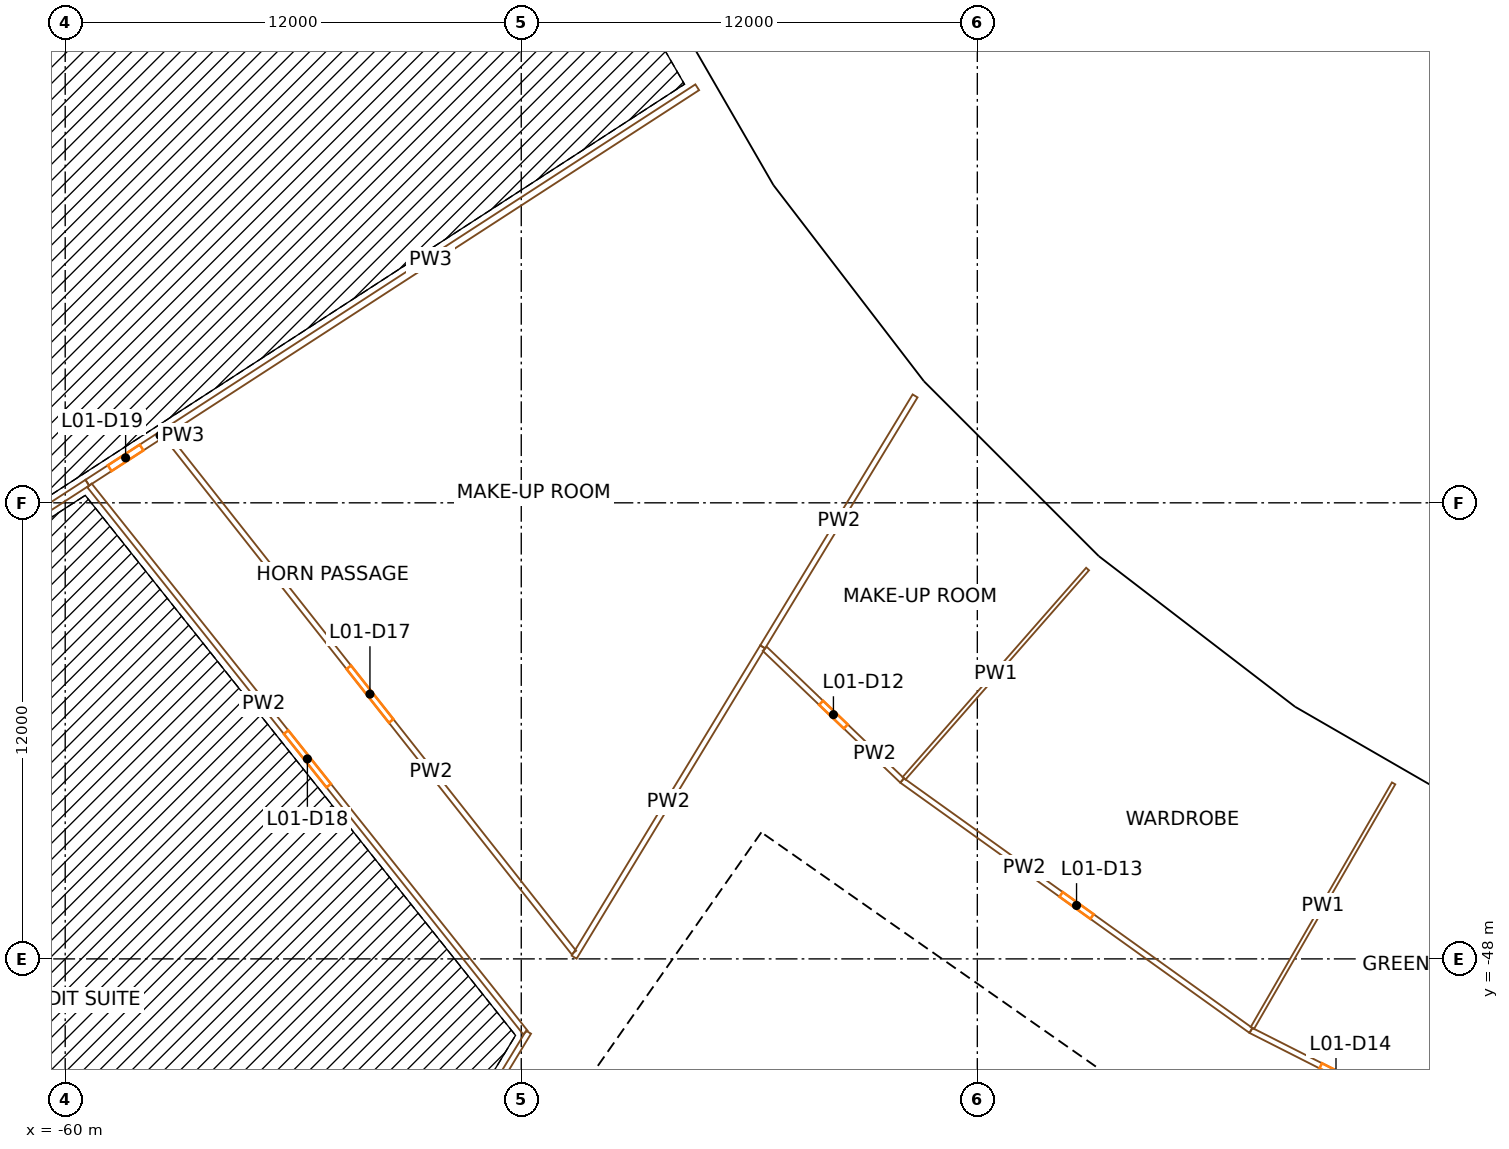
"""IFC4 building model, lengths in metres.
Left out: names, types, materials, properties, quantities, classifications, styles, units other than length and angle.
Written with IfcOpenShell. Run it as: python <this file> out.ifc"""

import sys

from ifc_helpers import new_model, si_unit, direction, frame, frame_2d, origin, origin_2d, place, context, subcontext, project, spatial, rectangle, extrude, element, fill, save


model = new_model("IFC4")
c1 = context("Model", 3, precision=1e-05, world=origin(), true_north=direction((0.0, 1.0)))
c2 = subcontext(c1, "Body", "Model", "MODEL_VIEW")
j1 = project(units=[si_unit("LENGTHUNIT", "METRE"), si_unit("PLANEANGLEUNIT", "RADIAN")], contexts=[c1])
p1 = place(None, origin())
s1 = spatial("IfcSite", under=j1, at=p1, CompositionType="ELEMENT")
p2 = place(p1, origin())
s2 = spatial("IfcBuilding", under=s1, at=p2, CompositionType="ELEMENT")
p3 = place(p2, frame((0.0, 0.0, 9.0)))
s3 = spatial("IfcBuildingStorey", under=s2, at=p3, CompositionType="ELEMENT", Elevation=9.0)
p4 = place(p3, frame((-52.243, -25.763, 0.0), z_axis=(0.0, 0.0, 1.0), x_axis=(0.442288690219, -0.896872741533, 0.0)))
e1 = element("IfcColumn", 1, at=p4, inside=s3, PredefinedType="COLUMN", context=c2, shape_type="SweptSolid", body=[
    extrude(rectangle(XDim=1.4, YDim=1.8, at=origin_2d()), origin(), (0.0, 0.0, 1.0), 9.0),
])
p5 = place(p3, frame((-42.197, -28.195, 0.0), z_axis=(0.0, 0.0, 1.0), x_axis=(0.55557023302, -0.831469612303, 0.0)))
e2 = element("IfcColumn", 2, at=p5, inside=s3, PredefinedType="COLUMN", context=c2, shape_type="SweptSolid", body=[
    extrude(rectangle(XDim=1.1, YDim=1.3, at=origin_2d()), origin(), (0.0, 0.0, 1.0), 9.0),
])
p6 = place(p3, frame((-48.433, -32.362, 0.0), z_axis=(0.0, 0.0, 1.0), x_axis=(0.55557023302, -0.831469612303, 0.0)))
e3 = element("IfcColumn", 3, at=p6, inside=s3, PredefinedType="COLUMN", context=c2, shape_type="SweptSolid", body=[
    extrude(rectangle(XDim=1.4, YDim=1.8, at=origin_2d()), origin(), (0.0, 0.0, 1.0), 9.0),
])
p7 = place(p3, frame((-38.156, -33.462, 0.0), z_axis=(0.0, 0.0, 1.0), x_axis=(0.6593458151, -0.751839807479, 0.0)))
e4 = element("IfcColumn", 4, at=p7, inside=s3, PredefinedType="COLUMN", context=c2, shape_type="SweptSolid", body=[
    extrude(rectangle(XDim=1.1, YDim=1.3, at=origin_2d()), origin(), (0.0, 0.0, 1.0), 9.0),
])
for number, where, z_axis, x_axis in (
    (5, (-43.795, -38.407, 0.0), (0.0, 0.0, 1.0), (0.659, -0.752, 0.0)),
    (6, (-58.456, -51.264, 0.0), (0.0, 0.0, 1.0), (0.659, -0.752, 0.0)),
):
    element("IfcColumn", number, at=place(p3, frame(where, z_axis=z_axis, x_axis=x_axis)), inside=s3, PredefinedType="COLUMN", context=c2, shape_type="SweptSolid", body=[
        extrude(rectangle(XDim=1.4, YDim=1.8, at=origin_2d()), origin(), (0.0, 0.0, 1.0), 9.0),
    ])
p8 = place(p3, frame((-33.462, -38.156, 0.0), z_axis=(0.0, 0.0, 1.0), x_axis=(0.751839807479, -0.6593458151, 0.0)))
e7 = element("IfcColumn", 7, at=p8, inside=s3, PredefinedType="COLUMN", context=c2, shape_type="SweptSolid", body=[
    extrude(rectangle(XDim=1.1, YDim=1.3, at=origin_2d()), origin(), (0.0, 0.0, 1.0), 9.0),
])
p9 = place(p3, frame((-38.407, -43.795, 0.0), z_axis=(0.0, 0.0, 1.0), x_axis=(0.751839807479, -0.6593458151, 0.0)))
e8 = element("IfcColumn", 8, at=p9, inside=s3, PredefinedType="COLUMN", context=c2, shape_type="SweptSolid", body=[
    extrude(rectangle(XDim=1.4, YDim=1.8, at=origin_2d()), origin(), (0.0, 0.0, 1.0), 9.0),
])
p10 = place(p3, frame((-28.195, -42.197, 0.0), z_axis=(0.0, 0.0, 1.0), x_axis=(0.831469612303, -0.55557023302, 0.0)))
e9 = element("IfcColumn", 9, at=p10, inside=s3, PredefinedType="COLUMN", context=c2, shape_type="SweptSolid", body=[
    extrude(rectangle(XDim=1.1, YDim=1.3, at=origin_2d()), origin(), (0.0, 0.0, 1.0), 9.0),
])
p11 = place(p3, frame((-32.362, -48.433, 0.0), z_axis=(0.0, 0.0, 1.0), x_axis=(0.831469612303, -0.55557023302, 0.0)))
e10 = element("IfcColumn", 10, at=p11, inside=s3, PredefinedType="COLUMN", context=c2, shape_type="SweptSolid", body=[
    extrude(rectangle(XDim=1.4, YDim=1.8, at=origin_2d()), origin(), (0.0, 0.0, 1.0), 9.0),
])
p12 = place(p3, frame((-49.779, -57.191, 0.0), z_axis=(0.0, 0.0, 1.0), x_axis=(0.573577477574, 0.819151315216, 0.0)))
e11 = element("IfcWall", 11, at=p12, inside=s3, PredefinedType="SHEAR", context=c2, shape_type="SweptSolid", body=[
    extrude(rectangle(XDim=14.8, YDim=0.9, at=frame_2d((7.4, 0.0))), origin(), (0.0, 0.0, 1.0), 8.6),
])
p13 = place(p12, frame((6.7, 0.0, 0.0)))
e12 = element("IfcOpeningElement", 12, at=p13, cuts=e11, PredefinedType="OPENING", context=c2, shape_type="SweptSolid", body=[
    extrude(rectangle(XDim=1.4, YDim=2.1, at=frame_2d((0.7, 1.05))), frame((0.0, 0.46, 0.0), z_axis=(0.0, -1.0, 0.0), x_axis=(1.0, 0.0, 0.0)), (0.0, 0.0, 1.0), 0.92),
])
p14 = place(p3, frame((-28.854, -54.324, 0.0), z_axis=(0.0, 0.0, 1.0), x_axis=(-0.819145767589, 0.573585400304, 0.0)))
e13 = element("IfcWall", 13, at=p14, inside=s3, PredefinedType="SHEAR", context=c2, shape_type="SweptSolid", body=[
    extrude(rectangle(XDim=15.045, YDim=0.9, at=frame_2d((7.523, 0.0))), origin(), (0.0, 0.0, 1.0), 8.6),
])
p15 = place(p14, frame((0.85, 0.0, 0.0)))
e14 = element("IfcOpeningElement", 14, at=p15, cuts=e13, PredefinedType="OPENING", context=c2, shape_type="SweptSolid", body=[
    extrude(rectangle(XDim=1.0, YDim=2.1, at=frame_2d((0.5, 1.05))), frame((0.0, 0.46, 0.0), z_axis=(0.0, -1.0, 0.0), x_axis=(1.0, 0.0, 0.0)), (0.0, 0.0, 1.0), 0.92),
])
p16 = place(p14, frame((3.575, 0.0, 0.0)))
e15 = element("IfcOpeningElement", 15, at=p16, cuts=e13, PredefinedType="OPENING", context=c2, shape_type="SweptSolid", body=[
    extrude(rectangle(XDim=1.0, YDim=2.1, at=frame_2d((0.5, 1.05))), frame((0.0, 0.46, 0.0), z_axis=(0.0, -1.0, 0.0), x_axis=(1.0, 0.0, 0.0)), (0.0, 0.0, 1.0), 0.92),
])
p17 = place(p14, frame((6.275, 0.0, 0.0)))
e16 = element("IfcOpeningElement", 16, at=p17, cuts=e13, PredefinedType="OPENING", context=c2, shape_type="SweptSolid", body=[
    extrude(rectangle(XDim=0.9, YDim=2.1, at=frame_2d((0.45, 1.05))), frame((0.0, 0.46, 0.0), z_axis=(0.0, -1.0, 0.0), x_axis=(1.0, 0.0, 0.0)), (0.0, 0.0, 1.0), 0.92),
])
p18 = place(p14, frame((13.495, 0.0, 0.0)))
e17 = element("IfcOpeningElement", 17, at=p18, cuts=e13, PredefinedType="OPENING", context=c2, shape_type="SweptSolid", body=[
    extrude(rectangle(XDim=1.1, YDim=2.1, at=frame_2d((0.55, 1.05))), frame((0.0, 0.46, 0.0), z_axis=(0.0, -1.0, 0.0), x_axis=(1.0, 0.0, 0.0)), (0.0, 0.0, 1.0), 0.92),
])
p19 = place(p3, frame((-43.204, -60.696, 0.0), z_axis=(0.0, 0.0, 1.0), x_axis=(0.573571992966, 0.819155155563, 0.0)))
e18 = element("IfcWall", 18, at=p19, inside=s3, PredefinedType="SOLIDWALL", context=c2, shape_type="SweptSolid", body=[
    extrude(rectangle(XDim=13.0, YDim=0.3, at=frame_2d((6.5, 0.0))), origin(), (0.0, 0.0, 1.0), 8.6),
])
p20 = place(p3, frame((-37.936, -52.91, 0.0), z_axis=(0.0, 0.0, 1.0), x_axis=(-0.819147518138, 0.57358290031, 0.0)))
e19 = element("IfcWall", 19, at=p20, inside=s3, PredefinedType="SOLIDWALL", context=c2, shape_type="SweptSolid", body=[
    extrude(rectangle(XDim=6.795, YDim=0.3, at=frame_2d((3.398, 0.0))), origin(), (0.0, 0.0, 1.0), 8.6),
])
p21 = place(p20, frame((5.32, 0.0, 0.0)))
e20 = element("IfcOpeningElement", 20, at=p21, cuts=e19, PredefinedType="OPENING", context=c2, shape_type="SweptSolid", body=[
    extrude(rectangle(XDim=1.1, YDim=2.1, at=frame_2d((0.55, 1.05))), frame((0.0, 0.16, 0.0), z_axis=(0.0, -1.0, 0.0), x_axis=(1.0, 0.0, 0.0)), (0.0, 0.0, 1.0), 0.32),
])
p22 = place(p3, frame((-41.587, -48.369, 0.0), z_axis=(0.0, 0.0, 1.0), x_axis=(0.573495128918, 0.819208970354, 0.0)))
e21 = element("IfcWall", 21, at=p22, inside=s3, PredefinedType="SOLIDWALL", context=c2, shape_type="SweptSolid", body=[
    extrude(rectangle(XDim=0.5, YDim=0.3, at=frame_2d((0.25, 0.0))), origin(), (0.0, 0.0, 1.0), 4.3),
])
p23 = place(p3, frame((-41.583, -27.714, 0.0), z_axis=(0.0, 0.0, 1.0), x_axis=(-0.50000447882, 0.866022817921, 0.0)))
e22 = element("IfcWall", 22, at=p23, inside=s3, PredefinedType="SOLIDWALL", context=c2, shape_type="SweptSolid", body=[
    extrude(rectangle(XDim=6.419, YDim=0.45, at=frame_2d((3.21, 0.0))), origin(), (0.0, 0.0, 1.0), 7.7),
])
p24 = place(p3, frame((-37.555, -32.975, 0.0), z_axis=(0.0, 0.0, 1.0), x_axis=(-0.608780327927, 0.793338838284, 0.0)))
e23 = element("IfcWall", 23, at=p24, inside=s3, PredefinedType="SOLIDWALL", context=c2, shape_type="SweptSolid", body=[
    extrude(rectangle(XDim=6.597, YDim=0.45, at=frame_2d((3.298, 0.0))), origin(), (0.0, 0.0, 1.0), 7.7),
])
p25 = place(p3, frame((-32.993, -37.532, 0.0), z_axis=(0.0, 0.0, 1.0), x_axis=(-0.707106781187, 0.707106781187, 0.0)))
e24 = element("IfcWall", 24, at=p25, inside=s3, PredefinedType="SOLIDWALL", context=c2, shape_type="SweptSolid", body=[
    extrude(rectangle(XDim=6.419, YDim=0.45, at=frame_2d((3.209, 0.0))), origin(), (0.0, 0.0, 1.0), 7.7),
])
p26 = place(p3, frame((-27.741, -41.571, 0.0), z_axis=(0.0, 0.0, 1.0), x_axis=(-0.793338838284, 0.608780327927, 0.0)))
e25 = element("IfcWall", 25, at=p26, inside=s3, PredefinedType="SOLIDWALL", context=c2, shape_type="SweptSolid", body=[
    extrude(rectangle(XDim=6.597, YDim=0.45, at=frame_2d((3.298, 0.0))), origin(), (0.0, 0.0, 1.0), 7.7),
])
p27 = place(p3, frame((-22.155, -44.792, 0.0), z_axis=(0.0, 0.0, 1.0), x_axis=(-0.866022817921, 0.50000447882, 0.0)))
e26 = element("IfcWall", 26, at=p27, inside=s3, PredefinedType="SOLIDWALL", context=c2, shape_type="SweptSolid", body=[
    extrude(rectangle(XDim=6.419, YDim=0.45, at=frame_2d((3.21, 0.0))), origin(), (0.0, 0.0, 1.0), 7.7),
])
p28 = place(p3, frame((-73.217, -44.416, 0.0), z_axis=(0.0, 0.0, 1.0), x_axis=(0.839098650594, 0.543979277703, 0.0)))
e27 = element("IfcWall", 27, at=p28, inside=s3, PredefinedType="PARTITIONING", context=c2, shape_type="SweptSolid", body=[
    extrude(rectangle(XDim=16.445, YDim=0.18, at=frame_2d((8.223, 0.0))), origin(), (0.0, 0.0, 1.0), 7.6),
])
p29 = place(p3, frame((-59.418, -35.47, 0.0), z_axis=(0.0, 0.0, 1.0), x_axis=(0.839081673018, 0.544005465051, 0.0)))
e28 = element("IfcWall", 28, at=p29, inside=s3, PredefinedType="PARTITIONING", context=c2, shape_type="SweptSolid", body=[
    extrude(rectangle(XDim=2.402, YDim=0.18, at=frame_2d((1.201, 0.0))), origin(), (0.0, 0.0, 1.0), 7.6),
])
p30 = place(p29, frame((0.701, 0.0, 0.0)))
e29 = element("IfcOpeningElement", 29, at=p30, cuts=e28, PredefinedType="OPENING", context=c2, shape_type="SweptSolid", body=[
    extrude(rectangle(XDim=1.0, YDim=2.1, at=frame_2d((0.5, 1.05))), frame((0.0, 0.1, 0.0), z_axis=(0.0, -1.0, 0.0), x_axis=(1.0, 0.0, 0.0)), (0.0, 0.0, 1.0), 0.2),
])
p31 = place(p3, frame((-57.403, -34.164, 0.0), z_axis=(0.0, 0.0, 1.0), x_axis=(0.83909708633, 0.543981690604, 0.0)))
e30 = element("IfcWall", 30, at=p31, inside=s3, PredefinedType="PARTITIONING", context=c2, shape_type="SweptSolid", body=[
    extrude(rectangle(XDim=16.723, YDim=0.18, at=frame_2d((8.362, 0.0))), origin(), (0.0, 0.0, 1.0), 7.6),
])
p32 = place(p3, frame((-47.893, -49.935, 0.0), z_axis=(0.0, 0.0, 1.0), x_axis=(-0.623145641882, 0.782105817011, 0.0)))
e31 = element("IfcWall", 31, at=p32, inside=s3, PredefinedType="PARTITIONING", context=c2, shape_type="SweptSolid", body=[
    extrude(rectangle(XDim=18.404, YDim=0.15, at=frame_2d((9.202, 0.0))), origin(), (0.0, 0.0, 1.0), 7.6),
])
p33 = place(p32, frame((8.302, 0.0, 0.0)))
e32 = element("IfcOpeningElement", 32, at=p33, cuts=e31, PredefinedType="OPENING", context=c2, shape_type="SweptSolid", body=[
    extrude(rectangle(XDim=1.8, YDim=2.1, at=frame_2d((0.9, 1.05))), frame((0.0, 0.085, 0.0), z_axis=(0.0, -1.0, 0.0), x_axis=(1.0, 0.0, 0.0)), (0.0, 0.0, 1.0), 0.17),
])
p34 = place(p3, frame((-47.808, -49.929, 0.0), z_axis=(0.0, 0.0, 1.0), x_axis=(-0.519169679695, -0.854671190392, 0.0)))
e33 = element("IfcWall", 33, at=p34, inside=s3, PredefinedType="PARTITIONING", context=c2, shape_type="SweptSolid", body=[
    extrude(rectangle(XDim=9.878, YDim=0.15, at=frame_2d((4.939, 0.0))), origin(), (0.0, 0.0, 1.0), 7.6),
])
p35 = place(p3, frame((-57.347, -34.235, 0.0), z_axis=(0.0, 0.0, 1.0), x_axis=(0.619516324984, -0.784983772494, 0.0)))
e34 = element("IfcWall", 34, at=p35, inside=s3, PredefinedType="PARTITIONING", context=c2, shape_type="SweptSolid", body=[
    extrude(rectangle(XDim=17.322, YDim=0.15, at=frame_2d((8.661, 0.0))), origin(), (0.0, 0.0, 1.0), 7.6),
])
p36 = place(p35, frame((7.761, 0.0, 0.0)))
e35 = element("IfcOpeningElement", 35, at=p36, cuts=e34, PredefinedType="OPENING", context=c2, shape_type="SweptSolid", body=[
    extrude(rectangle(XDim=1.8, YDim=2.1, at=frame_2d((0.9, 1.05))), frame((0.0, 0.085, 0.0), z_axis=(0.0, -1.0, 0.0), x_axis=(1.0, 0.0, 0.0)), (0.0, 0.0, 1.0), 0.17),
])
p37 = place(p3, frame((-41.648, -39.789, 0.0), z_axis=(0.0, 0.0, 1.0), x_axis=(-0.519144162426, -0.854686690325, 0.0)))
e36 = element("IfcWall", 36, at=p37, inside=s3, PredefinedType="PARTITIONING", context=c2, shape_type="SweptSolid", body=[
    extrude(rectangle(XDim=9.554, YDim=0.15, at=frame_2d((4.777, 0.0))), origin(), (0.0, 0.0, 1.0), 7.6),
])
p38 = place(p3, frame((-41.594, -39.841, 0.0), z_axis=(0.0, 0.0, 1.0), x_axis=(0.722034883006, -0.691856652582, 0.0)))
e37 = element("IfcWall", 37, at=p38, inside=s3, PredefinedType="PARTITIONING", context=c2, shape_type="SweptSolid", body=[
    extrude(rectangle(XDim=5.008, YDim=0.15, at=frame_2d((2.504, 0.0))), origin(), (0.0, 0.0, 1.0), 7.6),
])
p39 = place(p38, frame((2.054, 0.0, 0.0)))
e38 = element("IfcOpeningElement", 38, at=p39, cuts=e37, PredefinedType="OPENING", context=c2, shape_type="SweptSolid", body=[
    extrude(rectangle(XDim=0.9, YDim=2.1, at=frame_2d((0.45, 1.05))), frame((0.0, 0.085, 0.0), z_axis=(0.0, -1.0, 0.0), x_axis=(1.0, 0.0, 0.0)), (0.0, 0.0, 1.0), 0.17),
])
p40 = place(p3, frame((-37.978, -43.306, 0.0), z_axis=(0.0, 0.0, 1.0), x_axis=(0.812841355411, -0.582485133659, 0.0)))
e39 = element("IfcWall", 39, at=p40, inside=s3, PredefinedType="PARTITIONING", context=c2, shape_type="SweptSolid", body=[
    extrude(rectangle(XDim=11.292, YDim=0.15, at=frame_2d((5.646, 0.0))), origin(), (0.0, 0.0, 1.0), 7.6),
])
p41 = place(p40, frame((5.146, 0.0, 0.0)))
e40 = element("IfcOpeningElement", 40, at=p41, cuts=e39, PredefinedType="OPENING", context=c2, shape_type="SweptSolid", body=[
    extrude(rectangle(XDim=1.0, YDim=2.1, at=frame_2d((0.5, 1.05))), frame((0.0, 0.085, 0.0), z_axis=(0.0, -1.0, 0.0), x_axis=(1.0, 0.0, 0.0)), (0.0, 0.0, 1.0), 0.17),
])
p42 = place(p3, frame((-37.638, -33.187, 0.0), z_axis=(0.0, 0.0, 1.0), x_axis=(-0.519163683086, -0.854674833, 0.0)))
e41 = element("IfcWall", 41, at=p42, inside=s3, PredefinedType="PARTITIONING", context=c2, shape_type="SweptSolid", body=[
    extrude(rectangle(XDim=7.725, YDim=0.15, at=frame_2d((3.862, 0.0))), origin(), (0.0, 0.0, 1.0), 7.6),
])
p43 = place(p3, frame((-33.099, -37.742, 0.0), z_axis=(0.0, 0.0, 1.0), x_axis=(-0.659365444899, -0.751822592154, 0.0)))
e42 = element("IfcWall", 42, at=p43, inside=s3, PredefinedType="PARTITIONING", context=c2, shape_type="SweptSolid", body=[
    extrude(rectangle(XDim=7.325, YDim=0.1, at=frame_2d((3.663, 0.0))), origin(), (0.0, 0.0, 1.0), 7.6),
])
p44 = place(p3, frame((-28.8, -49.883, 0.0), z_axis=(0.0, 0.0, 1.0), x_axis=(0.8920980474, -0.451841868164, 0.0)))
e43 = element("IfcWall", 43, at=p44, inside=s3, PredefinedType="PARTITIONING", context=c2, shape_type="SweptSolid", body=[
    extrude(rectangle(XDim=6.216, YDim=0.15, at=frame_2d((3.108, 0.0))), origin(), (0.0, 0.0, 1.0), 7.6),
])
p45 = place(p44, frame((2.058, 0.0, 0.0)))
e44 = element("IfcOpeningElement", 44, at=p45, cuts=e43, PredefinedType="OPENING", context=c2, shape_type="SweptSolid", body=[
    extrude(rectangle(XDim=0.9, YDim=2.1, at=frame_2d((0.45, 1.05))), frame((0.0, 0.085, 0.0), z_axis=(0.0, -1.0, 0.0), x_axis=(1.0, 0.0, 0.0)), (0.0, 0.0, 1.0), 0.17),
])
p46 = place(p3, frame((-25.047, -43.382, 0.0), z_axis=(0.0, 0.0, 1.0), x_axis=(-0.500011569389, -0.866018724091, 0.0)))
e45 = element("IfcWall", 45, at=p46, inside=s3, PredefinedType="PARTITIONING", context=c2, shape_type="SweptSolid", body=[
    extrude(rectangle(XDim=7.431, YDim=0.1, at=frame_2d((3.716, 0.0))), origin(), (0.0, 0.0, 1.0), 7.6),
])
p47 = place(p17, origin())
e46 = element("IfcDoor", 46, at=p47, inside=s3, OperationType="SINGLE_SWING_LEFT", PredefinedType="DOOR", context=c2, shape_type="SweptSolid", body=[
    extrude(rectangle(XDim=0.9, YDim=2.1, at=frame_2d((0.45, 1.05))), frame((0.0, 0.025, 0.0), z_axis=(0.0, -1.0, 0.0), x_axis=(1.0, 0.0, 0.0)), (0.0, 0.0, 1.0), 0.05),
])
fill(e16, e46)
p48 = place(p13, origin())
e47 = element("IfcDoor", 47, at=p48, inside=s3, OperationType="DOUBLE_DOOR_SINGLE_SWING", PredefinedType="DOOR", context=c2, shape_type="SweptSolid", body=[
    extrude(rectangle(XDim=1.4, YDim=2.1, at=frame_2d((0.7, 1.05))), frame((0.0, 0.025, 0.0), z_axis=(0.0, -1.0, 0.0), x_axis=(1.0, 0.0, 0.0)), (0.0, 0.0, 1.0), 0.05),
])
fill(e12, e47)
p49 = place(p18, origin())
e48 = element("IfcDoor", 48, at=p49, inside=s3, OperationType="SINGLE_SWING_RIGHT", PredefinedType="DOOR", context=c2, shape_type="SweptSolid", body=[
    extrude(rectangle(XDim=1.1, YDim=2.1, at=frame_2d((0.55, 1.05))), frame((0.0, 0.025, 0.0), z_axis=(0.0, -1.0, 0.0), x_axis=(1.0, 0.0, 0.0)), (0.0, 0.0, 1.0), 0.05),
])
fill(e17, e48)
p50 = place(p21, origin())
e49 = element("IfcDoor", 49, at=p50, inside=s3, OperationType="SINGLE_SWING_LEFT", PredefinedType="DOOR", context=c2, shape_type="SweptSolid", body=[
    extrude(rectangle(XDim=1.1, YDim=2.1, at=frame_2d((0.55, 1.05))), frame((0.0, 0.025, 0.0), z_axis=(0.0, -1.0, 0.0), x_axis=(1.0, 0.0, 0.0)), (0.0, 0.0, 1.0), 0.05),
])
fill(e20, e49)
p51 = place(p39, origin())
e50 = element("IfcDoor", 50, at=p51, inside=s3, OperationType="SINGLE_SWING_RIGHT", PredefinedType="DOOR", context=c2, shape_type="SweptSolid", body=[
    extrude(rectangle(XDim=0.9, YDim=2.1, at=frame_2d((0.45, 1.05))), frame((0.0, 0.025, 0.0), z_axis=(0.0, -1.0, 0.0), x_axis=(1.0, 0.0, 0.0)), (0.0, 0.0, 1.0), 0.05),
])
fill(e38, e50)
p52 = place(p41, origin())
e51 = element("IfcDoor", 51, at=p52, inside=s3, OperationType="SINGLE_SWING_RIGHT", PredefinedType="DOOR", context=c2, shape_type="SweptSolid", body=[
    extrude(rectangle(XDim=1.0, YDim=2.1, at=frame_2d((0.5, 1.05))), frame((0.0, 0.025, 0.0), z_axis=(0.0, -1.0, 0.0), x_axis=(1.0, 0.0, 0.0)), (0.0, 0.0, 1.0), 0.05),
])
fill(e40, e51)
p53 = place(p45, origin())
e52 = element("IfcDoor", 52, at=p53, inside=s3, OperationType="SINGLE_SWING_LEFT", PredefinedType="DOOR", context=c2, shape_type="SweptSolid", body=[
    extrude(rectangle(XDim=0.9, YDim=2.1, at=frame_2d((0.45, 1.05))), frame((0.0, 0.025, 0.0), z_axis=(0.0, -1.0, 0.0), x_axis=(1.0, 0.0, 0.0)), (0.0, 0.0, 1.0), 0.05),
])
fill(e44, e52)
p54 = place(p36, origin())
e53 = element("IfcDoor", 53, at=p54, inside=s3, OperationType="DOUBLE_DOOR_SINGLE_SWING", PredefinedType="DOOR", context=c2, shape_type="SweptSolid", body=[
    extrude(rectangle(XDim=1.8, YDim=2.1, at=frame_2d((0.9, 1.05))), frame((0.0, 0.025, 0.0), z_axis=(0.0, -1.0, 0.0), x_axis=(1.0, 0.0, 0.0)), (0.0, 0.0, 1.0), 0.05),
])
fill(e35, e53)
p55 = place(p33, origin())
e54 = element("IfcDoor", 54, at=p55, inside=s3, OperationType="DOUBLE_DOOR_SINGLE_SWING", PredefinedType="DOOR", context=c2, shape_type="SweptSolid", body=[
    extrude(rectangle(XDim=1.8, YDim=2.1, at=frame_2d((0.9, 1.05))), frame((0.0, 0.025, 0.0), z_axis=(0.0, -1.0, 0.0), x_axis=(1.0, 0.0, 0.0)), (0.0, 0.0, 1.0), 0.05),
])
fill(e32, e54)
p56 = place(p30, origin())
e55 = element("IfcDoor", 55, at=p56, inside=s3, OperationType="SINGLE_SWING_RIGHT", PredefinedType="DOOR", context=c2, shape_type="SweptSolid", body=[
    extrude(rectangle(XDim=1.0, YDim=2.1, at=frame_2d((0.5, 1.05))), frame((0.0, 0.025, 0.0), z_axis=(0.0, -1.0, 0.0), x_axis=(1.0, 0.0, 0.0)), (0.0, 0.0, 1.0), 0.05),
])
fill(e29, e55)
save(model, sys.argv[1])
